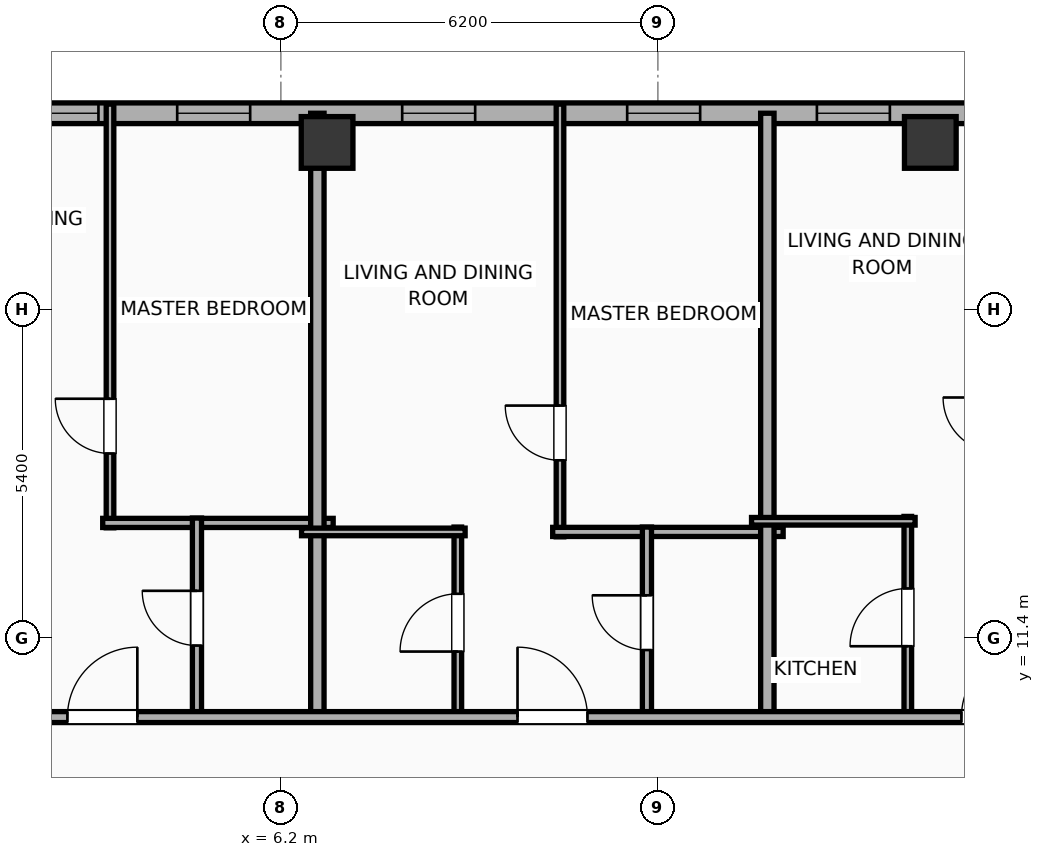
"""IFC4 building model, lengths in metres.
Left out: names, types, materials, properties, quantities, classifications, styles, units other than length and angle.
Written with IfcOpenShell. Run it as: python <this file> out.ifc"""

import sys

from ifc_helpers import new_model, si_unit, direction, frame, frame_2d, origin, origin_2d, place, context, subcontext, project, spatial, rectangle, hollow_rectangle, extrude, element, fill, save


model = new_model("IFC4")
c1 = context("Model", 3, precision=1e-05, world=origin(), true_north=direction((0.0, 1.0)))
c2 = subcontext(c1, "Body", "Model", "MODEL_VIEW")
j1 = project(units=[si_unit("LENGTHUNIT", "METRE"), si_unit("PLANEANGLEUNIT", "RADIAN")], contexts=[c1])
p1 = place(None, origin())
s1 = spatial("IfcSite", under=j1, at=p1, CompositionType="ELEMENT")
p2 = place(p1, origin())
s2 = spatial("IfcBuilding", under=s1, at=p2, CompositionType="ELEMENT")
p3 = place(p2, frame((0.0, 0.0, 235.3)))
s3 = spatial("IfcBuildingStorey", under=s2, at=p3, CompositionType="ELEMENT", Elevation=235.3)
for number, where, z_axis, x_axis in (
    (1, (16.88, 19.55, 0.0), (0.0, 0.0, 1.0), (1.0, 0.0, 0.0)),
    (2, (6.96, 19.55, 0.0), (0.0, 0.0, 1.0), (1.0, 0.0, 0.0)),
):
    element("IfcColumn", number, at=place(p3, frame(where, z_axis=z_axis, x_axis=x_axis)), inside=s3, PredefinedType="COLUMN", context=c2, shape_type="SweptSolid", body=[
        extrude(hollow_rectangle(XDim=0.85, YDim=0.85, WallThickness=0.028, at=origin_2d()), origin(), (0.0, 0.0, 1.0), 3.9),
    ])
p4 = place(p3, frame((-22.783, 20.03, 0.0), z_axis=(0.0, 0.0, 1.0), x_axis=(1.0, 0.0, 0.0)))
e3 = element("IfcWall", 3, at=p4, inside=s3, PredefinedType="ELEMENTEDWALL", context=c2, shape_type="SweptSolid", body=[
    extrude(rectangle(XDim=49.566, YDim=0.34, at=frame_2d((24.783, 0.0))), origin(), (0.0, 0.0, 1.0), 3.65),
])
p5 = place(p4, frame((23.583, 0.0, 0.75)))
e4 = element("IfcOpeningElement", 4, at=p5, cuts=e3, PredefinedType="OPENING", context=c2, shape_type="SweptSolid", body=[
    extrude(rectangle(XDim=2.4, YDim=2.1, at=frame_2d((1.2, 1.05))), frame((0.0, 0.18, 0.0), z_axis=(0.0, -1.0, 0.0), x_axis=(1.0, 0.0, 0.0)), (0.0, 0.0, 1.0), 0.36),
])
p6 = place(p4, frame((40.956, 0.0, 0.75)))
e5 = element("IfcOpeningElement", 5, at=p6, cuts=e3, PredefinedType="OPENING", context=c2, shape_type="SweptSolid", body=[
    extrude(rectangle(XDim=2.4, YDim=2.1, at=frame_2d((1.2, 1.05))), frame((0.0, 0.18, 0.0), z_axis=(0.0, -1.0, 0.0), x_axis=(1.0, 0.0, 0.0)), (0.0, 0.0, 1.0), 0.36),
])
p7 = place(p4, frame((5.078, 0.0, 0.75)))
e6 = element("IfcOpeningElement", 6, at=p7, cuts=e3, PredefinedType="OPENING", context=c2, shape_type="SweptSolid", body=[
    extrude(rectangle(XDim=1.2, YDim=2.05, at=frame_2d((0.6, 1.025))), frame((0.0, 0.18, 0.0), z_axis=(0.0, -1.0, 0.0), x_axis=(1.0, 0.0, 0.0)), (0.0, 0.0, 1.0), 0.36),
])
p8 = place(p4, frame((8.058, 0.0, 0.75)))
e7 = element("IfcOpeningElement", 7, at=p8, cuts=e3, PredefinedType="OPENING", context=c2, shape_type="SweptSolid", body=[
    extrude(rectangle(XDim=1.2, YDim=2.05, at=frame_2d((0.6, 1.025))), frame((0.0, 0.18, 0.0), z_axis=(0.0, -1.0, 0.0), x_axis=(1.0, 0.0, 0.0)), (0.0, 0.0, 1.0), 0.36),
])
p9 = place(p4, frame((12.478, 0.0, 0.75)))
e8 = element("IfcOpeningElement", 8, at=p9, cuts=e3, PredefinedType="OPENING", context=c2, shape_type="SweptSolid", body=[
    extrude(rectangle(XDim=1.2, YDim=2.05, at=frame_2d((0.6, 1.025))), frame((0.0, 0.18, 0.0), z_axis=(0.0, -1.0, 0.0), x_axis=(1.0, 0.0, 0.0)), (0.0, 0.0, 1.0), 0.36),
])
p10 = place(p4, frame((16.178, 0.0, 0.75)))
e9 = element("IfcOpeningElement", 9, at=p10, cuts=e3, PredefinedType="OPENING", context=c2, shape_type="SweptSolid", body=[
    extrude(rectangle(XDim=1.2, YDim=2.05, at=frame_2d((0.6, 1.025))), frame((0.0, 0.18, 0.0), z_axis=(0.0, -1.0, 0.0), x_axis=(1.0, 0.0, 0.0)), (0.0, 0.0, 1.0), 0.36),
])
p11 = place(p4, frame((20.478, 0.0, 0.75)))
e10 = element("IfcOpeningElement", 10, at=p11, cuts=e3, PredefinedType="OPENING", context=c2, shape_type="SweptSolid", body=[
    extrude(rectangle(XDim=1.2, YDim=2.05, at=frame_2d((0.6, 1.025))), frame((0.0, 0.18, 0.0), z_axis=(0.0, -1.0, 0.0), x_axis=(1.0, 0.0, 0.0)), (0.0, 0.0, 1.0), 0.36),
])
p12 = place(p4, frame((27.278, 0.0, 0.75)))
e11 = element("IfcOpeningElement", 11, at=p12, cuts=e3, PredefinedType="OPENING", context=c2, shape_type="SweptSolid", body=[
    extrude(rectangle(XDim=1.2, YDim=2.05, at=frame_2d((0.6, 1.025))), frame((0.0, 0.18, 0.0), z_axis=(0.0, -1.0, 0.0), x_axis=(1.0, 0.0, 0.0)), (0.0, 0.0, 1.0), 0.36),
])
p13 = place(p4, frame((30.978, 0.0, 0.75)))
e12 = element("IfcOpeningElement", 12, at=p13, cuts=e3, PredefinedType="OPENING", context=c2, shape_type="SweptSolid", body=[
    extrude(rectangle(XDim=1.2, YDim=2.05, at=frame_2d((0.6, 1.025))), frame((0.0, 0.18, 0.0), z_axis=(0.0, -1.0, 0.0), x_axis=(1.0, 0.0, 0.0)), (0.0, 0.0, 1.0), 0.36),
])
p14 = place(p4, frame((34.678, 0.0, 0.75)))
e13 = element("IfcOpeningElement", 13, at=p14, cuts=e3, PredefinedType="OPENING", context=c2, shape_type="SweptSolid", body=[
    extrude(rectangle(XDim=1.2, YDim=2.05, at=frame_2d((0.6, 1.025))), frame((0.0, 0.18, 0.0), z_axis=(0.0, -1.0, 0.0), x_axis=(1.0, 0.0, 0.0)), (0.0, 0.0, 1.0), 0.36),
])
p15 = place(p4, frame((37.798, 0.0, 0.75)))
e14 = element("IfcOpeningElement", 14, at=p15, cuts=e3, PredefinedType="OPENING", context=c2, shape_type="SweptSolid", body=[
    extrude(rectangle(XDim=1.2, YDim=2.05, at=frame_2d((0.6, 1.025))), frame((0.0, 0.18, 0.0), z_axis=(0.0, -1.0, 0.0), x_axis=(1.0, 0.0, 0.0)), (0.0, 0.0, 1.0), 0.36),
])
p16 = place(p4, frame((45.83, 0.0, 0.75)))
e15 = element("IfcOpeningElement", 15, at=p16, cuts=e3, PredefinedType="OPENING", context=c2, shape_type="SweptSolid", body=[
    extrude(rectangle(XDim=1.2, YDim=2.05, at=frame_2d((0.6, 1.025))), frame((0.0, 0.18, 0.0), z_axis=(0.0, -1.0, 0.0), x_axis=(1.0, 0.0, 0.0)), (0.0, 0.0, 1.0), 0.36),
])
p17 = place(p3, frame((3.39, 13.213, 0.0), z_axis=(0.0, 0.0, 1.0), x_axis=(0.0, 1.0, 0.0)))
e16 = element("IfcWall", 16, at=p17, inside=s3, PredefinedType="PARTITIONING", context=c2, shape_type="SweptSolid", body=[
    extrude(rectangle(XDim=6.967, YDim=0.125, at=frame_2d((3.483, 0.0))), origin(), (0.0, 0.0, 1.0), 3.65),
])
p18 = place(p17, frame((1.222, 0.0, 0.0)))
e17 = element("IfcOpeningElement", 17, at=p18, cuts=e16, PredefinedType="OPENING", context=c2, shape_type="SweptSolid", body=[
    extrude(rectangle(XDim=0.9, YDim=2.05, at=frame_2d((0.45, 1.025))), frame((0.0, 0.073, 0.0), z_axis=(0.0, -1.0, 0.0), x_axis=(1.0, 0.0, 0.0)), (0.0, 0.0, 1.0), 0.145),
])
p19 = place(p3, frame((3.27, 13.293, 0.0), z_axis=(0.0, 0.0, 1.0), x_axis=(1.0, 0.0, 0.0)))
e18 = element("IfcWall", 18, at=p19, inside=s3, PredefinedType="PLUMBINGWALL", context=c2, shape_type="SweptSolid", body=[
    extrude(rectangle(XDim=3.79, YDim=0.15, at=frame_2d((1.895, 0.0))), origin(), (0.0, 0.0, 1.0), 3.65),
])
p20 = place(p3, frame((4.82, 10.08, 0.0), z_axis=(0.0, 0.0, 1.0), x_axis=(0.0, 1.0, 0.0)))
e19 = element("IfcWall", 19, at=p20, inside=s3, PredefinedType="PLUMBINGWALL", context=c2, shape_type="SweptSolid", body=[
    extrude(rectangle(XDim=3.293, YDim=0.15, at=frame_2d((1.646, 0.0))), origin(), (0.0, 0.0, 1.0), 3.09),
])
p21 = place(p20, frame((1.197, 0.0, 0.0)))
e20 = element("IfcOpeningElement", 20, at=p21, cuts=e19, PredefinedType="OPENING", context=c2, shape_type="SweptSolid", body=[
    extrude(rectangle(XDim=0.9, YDim=2.05, at=frame_2d((0.45, 1.025))), frame((0.0, 0.085, 0.0), z_axis=(0.0, -1.0, 0.0), x_axis=(1.0, 0.0, 0.0)), (0.0, 0.0, 1.0), 0.17),
])
p22 = place(p3, frame((6.8, 10.02, 0.0), z_axis=(0.0, 0.0, 1.0), x_axis=(0.0, 1.0, 0.0)))
e21 = element("IfcWall", 21, at=p22, inside=s3, PredefinedType="PARTITIONING", context=c2, shape_type="SweptSolid", body=[
    extrude(rectangle(XDim=10.01, YDim=0.22, at=frame_2d((5.005, 0.0))), origin(), (0.0, 0.0, 1.0), 3.09),
])
p23 = place(p3, frame((10.79, 13.065, 0.0), z_axis=(0.0, 0.0, 1.0), x_axis=(0.0, 1.0, 0.0)))
e22 = element("IfcWall", 22, at=p23, inside=s3, PredefinedType="PARTITIONING", context=c2, shape_type="SweptSolid", body=[
    extrude(rectangle(XDim=7.115, YDim=0.125, at=frame_2d((3.558, 0.0))), origin(), (0.0, 0.0, 1.0), 3.65),
])
p24 = place(p23, frame((1.258, 0.0, 0.0)))
e23 = element("IfcOpeningElement", 23, at=p24, cuts=e22, PredefinedType="OPENING", context=c2, shape_type="SweptSolid", body=[
    extrude(rectangle(XDim=0.9, YDim=2.05, at=frame_2d((0.45, 1.025))), frame((0.0, 0.073, 0.0), z_axis=(0.0, -1.0, 0.0), x_axis=(1.0, 0.0, 0.0)), (0.0, 0.0, 1.0), 0.145),
])
p25 = place(p3, frame((10.67, 13.145, 0.0), z_axis=(0.0, 0.0, 1.0), x_axis=(1.0, 0.0, 0.0)))
e24 = element("IfcWall", 24, at=p25, inside=s3, PredefinedType="PLUMBINGWALL", context=c2, shape_type="SweptSolid", body=[
    extrude(rectangle(XDim=3.79, YDim=0.15, at=frame_2d((1.895, 0.0))), origin(), (0.0, 0.0, 1.0), 3.65),
])
p26 = place(p3, frame((9.11, 10.08, 0.0), z_axis=(0.0, 0.0, 1.0), x_axis=(0.0, 1.0, 0.0)))
e25 = element("IfcWall", 25, at=p26, inside=s3, PredefinedType="PARTITIONING", context=c2, shape_type="SweptSolid", body=[
    extrude(rectangle(XDim=3.145, YDim=0.125, at=frame_2d((1.573, 0.0))), origin(), (0.0, 0.0, 1.0), 3.65),
])
p27 = place(p26, frame((1.097, 0.0, 0.0)))
e26 = element("IfcOpeningElement", 26, at=p27, cuts=e25, PredefinedType="OPENING", context=c2, shape_type="SweptSolid", body=[
    extrude(rectangle(XDim=0.95, YDim=2.05, at=frame_2d((0.475, 1.025))), frame((0.0, 0.073, 0.0), z_axis=(0.0, -1.0, 0.0), x_axis=(1.0, 0.0, 0.0)), (0.0, 0.0, 1.0), 0.145),
])
p28 = place(p3, frame((6.54, 13.145, 0.0), z_axis=(0.0, 0.0, 1.0), x_axis=(1.0, 0.0, 0.0)))
e27 = element("IfcWall", 27, at=p28, inside=s3, PredefinedType="PARTITIONING", context=c2, shape_type="SweptSolid", body=[
    extrude(rectangle(XDim=2.69, YDim=0.125, at=frame_2d((1.345, 0.0))), origin(), (0.0, 0.0, 1.0), 3.65),
])
p29 = place(p3, frame((12.22, 10.08, 0.0), z_axis=(0.0, 0.0, 1.0), x_axis=(0.0, 1.0, 0.0)))
e28 = element("IfcWall", 28, at=p29, inside=s3, PredefinedType="PLUMBINGWALL", context=c2, shape_type="SweptSolid", body=[
    extrude(rectangle(XDim=3.145, YDim=0.15, at=frame_2d((1.573, 0.0))), origin(), (0.0, 0.0, 1.0), 3.65),
])
p30 = place(p29, frame((1.123, 0.0, 0.0)))
e29 = element("IfcOpeningElement", 29, at=p30, cuts=e28, PredefinedType="OPENING", context=c2, shape_type="SweptSolid", body=[
    extrude(rectangle(XDim=0.9, YDim=2.05, at=frame_2d((0.45, 1.025))), frame((0.0, 0.085, 0.0), z_axis=(0.0, -1.0, 0.0), x_axis=(1.0, 0.0, 0.0)), (0.0, 0.0, 1.0), 0.17),
])
p31 = place(p3, frame((14.2, 10.02, 0.0), z_axis=(0.0, 0.0, 1.0), x_axis=(0.0, 1.0, 0.0)))
e30 = element("IfcWall", 30, at=p31, inside=s3, PredefinedType="PARTITIONING", context=c2, shape_type="SweptSolid", body=[
    extrude(rectangle(XDim=10.01, YDim=0.22, at=frame_2d((5.005, 0.0))), origin(), (0.0, 0.0, 1.0), 3.65),
])
p32 = place(p3, frame((16.51, 10.08, 0.0), z_axis=(0.0, 0.0, 1.0), x_axis=(0.0, 1.0, 0.0)))
e31 = element("IfcWall", 31, at=p32, inside=s3, PredefinedType="PARTITIONING", context=c2, shape_type="SweptSolid", body=[
    extrude(rectangle(XDim=3.32, YDim=0.125, at=frame_2d((1.66, 0.0))), origin(), (0.0, 0.0, 1.0), 3.65),
])
p33 = place(p32, frame((1.185, 0.0, 0.0)))
e32 = element("IfcOpeningElement", 32, at=p33, cuts=e31, PredefinedType="OPENING", context=c2, shape_type="SweptSolid", body=[
    extrude(rectangle(XDim=0.95, YDim=2.05, at=frame_2d((0.475, 1.025))), frame((0.0, 0.073, 0.0), z_axis=(0.0, -1.0, 0.0), x_axis=(1.0, 0.0, 0.0)), (0.0, 0.0, 1.0), 0.145),
])
p34 = place(p3, frame((13.94, 13.32, 0.0), z_axis=(0.0, 0.0, 1.0), x_axis=(1.0, 0.0, 0.0)))
e33 = element("IfcWall", 33, at=p34, inside=s3, PredefinedType="PARTITIONING", context=c2, shape_type="SweptSolid", body=[
    extrude(rectangle(XDim=2.69, YDim=0.125, at=frame_2d((1.345, 0.0))), origin(), (0.0, 0.0, 1.0), 3.65),
])
p35 = place(p3, frame((-26.23, 10.1, 0.0), z_axis=(0.0, 0.0, 1.0), x_axis=(1.0, 0.0, 0.0)))
e34 = element("IfcWall", 34, at=p35, inside=s3, PredefinedType="PARTITIONING", context=c2, shape_type="SweptSolid", body=[
    extrude(rectangle(XDim=56.46, YDim=0.18, at=frame_2d((28.23, 0.0))), origin(), (0.0, 0.0, 1.0), 3.65),
])
p36 = place(p35, frame((5.302, 0.0, 0.0)))
e35 = element("IfcOpeningElement", 35, at=p36, cuts=e34, PredefinedType="OPENING", context=c2, shape_type="SweptSolid", body=[
    extrude(rectangle(XDim=1.15, YDim=2.05, at=frame_2d((0.575, 1.025))), frame((0.0, 0.1, 0.0), z_axis=(0.0, -1.0, 0.0), x_axis=(1.0, 0.0, 0.0)), (0.0, 0.0, 1.0), 0.2),
])
p37 = place(p35, frame((14.122, 0.0, 0.0)))
e36 = element("IfcOpeningElement", 36, at=p37, cuts=e34, PredefinedType="OPENING", context=c2, shape_type="SweptSolid", body=[
    extrude(rectangle(XDim=1.15, YDim=2.05, at=frame_2d((0.575, 1.025))), frame((0.0, 0.1, 0.0), z_axis=(0.0, -1.0, 0.0), x_axis=(1.0, 0.0, 0.0)), (0.0, 0.0, 1.0), 0.2),
])
p38 = place(p35, frame((21.518, 0.0, 0.0)))
e37 = element("IfcOpeningElement", 37, at=p38, cuts=e34, PredefinedType="OPENING", context=c2, shape_type="SweptSolid", body=[
    extrude(rectangle(XDim=1.15, YDim=2.05, at=frame_2d((0.575, 1.025))), frame((0.0, 0.1, 0.0), z_axis=(0.0, -1.0, 0.0), x_axis=(1.0, 0.0, 0.0)), (0.0, 0.0, 1.0), 0.2),
])
p39 = place(p35, frame((28.92, 0.0, 0.0)))
e38 = element("IfcOpeningElement", 38, at=p39, cuts=e34, PredefinedType="OPENING", context=c2, shape_type="SweptSolid", body=[
    extrude(rectangle(XDim=1.15, YDim=2.05, at=frame_2d((0.575, 1.025))), frame((0.0, 0.1, 0.0), z_axis=(0.0, -1.0, 0.0), x_axis=(1.0, 0.0, 0.0)), (0.0, 0.0, 1.0), 0.2),
])
p40 = place(p35, frame((36.322, 0.0, 0.0)))
e39 = element("IfcOpeningElement", 39, at=p40, cuts=e34, PredefinedType="OPENING", context=c2, shape_type="SweptSolid", body=[
    extrude(rectangle(XDim=1.15, YDim=2.05, at=frame_2d((0.575, 1.025))), frame((0.0, 0.1, 0.0), z_axis=(0.0, -1.0, 0.0), x_axis=(1.0, 0.0, 0.0)), (0.0, 0.0, 1.0), 0.2),
])
p41 = place(p35, frame((43.622, 0.0, 0.0)))
e40 = element("IfcOpeningElement", 40, at=p41, cuts=e34, PredefinedType="OPENING", context=c2, shape_type="SweptSolid", body=[
    extrude(rectangle(XDim=1.15, YDim=2.05, at=frame_2d((0.575, 1.025))), frame((0.0, 0.1, 0.0), z_axis=(0.0, -1.0, 0.0), x_axis=(1.0, 0.0, 0.0)), (0.0, 0.0, 1.0), 0.2),
])
p42 = place(p35, frame((51.781, 0.0, 0.0)))
e41 = element("IfcOpeningElement", 41, at=p42, cuts=e34, PredefinedType="OPENING", context=c2, shape_type="SweptSolid", body=[
    extrude(rectangle(XDim=1.15, YDim=2.05, at=frame_2d((0.575, 1.025))), frame((0.0, 0.1, 0.0), z_axis=(0.0, -1.0, 0.0), x_axis=(1.0, 0.0, 0.0)), (0.0, 0.0, 1.0), 0.2),
])
p43 = place(p5, origin())
e42 = element("IfcWindow", 42, at=p43, inside=s3, PartitioningType="SINGLE_PANEL", PredefinedType="WINDOW", context=c2, shape_type="SweptSolid", body=[
    extrude(rectangle(XDim=2.4, YDim=2.1, at=frame_2d((1.2, 1.05))), frame((0.0, 0.03, 0.0), z_axis=(0.0, -1.0, 0.0), x_axis=(1.0, 0.0, 0.0)), (0.0, 0.0, 1.0), 0.06),
])
fill(e4, e42)
p44 = place(p12, origin())
e43 = element("IfcWindow", 43, at=p44, inside=s3, PartitioningType="SINGLE_PANEL", PredefinedType="WINDOW", context=c2, shape_type="SweptSolid", body=[
    extrude(rectangle(XDim=1.2, YDim=2.05, at=frame_2d((0.6, 1.025))), frame((0.0, 0.03, 0.0), z_axis=(0.0, -1.0, 0.0), x_axis=(1.0, 0.0, 0.0)), (0.0, 0.0, 1.0), 0.06),
])
fill(e11, e43)
p45 = place(p13, origin())
e44 = element("IfcWindow", 44, at=p45, inside=s3, PartitioningType="SINGLE_PANEL", PredefinedType="WINDOW", context=c2, shape_type="SweptSolid", body=[
    extrude(rectangle(XDim=1.2, YDim=2.05, at=frame_2d((0.6, 1.025))), frame((0.0, 0.03, 0.0), z_axis=(0.0, -1.0, 0.0), x_axis=(1.0, 0.0, 0.0)), (0.0, 0.0, 1.0), 0.06),
])
fill(e12, e44)
p46 = place(p14, origin())
e45 = element("IfcWindow", 45, at=p46, inside=s3, PartitioningType="SINGLE_PANEL", PredefinedType="WINDOW", context=c2, shape_type="SweptSolid", body=[
    extrude(rectangle(XDim=1.2, YDim=2.05, at=frame_2d((0.6, 1.025))), frame((0.0, 0.03, 0.0), z_axis=(0.0, -1.0, 0.0), x_axis=(1.0, 0.0, 0.0)), (0.0, 0.0, 1.0), 0.06),
])
fill(e13, e45)
p47 = place(p15, origin())
e46 = element("IfcWindow", 46, at=p47, inside=s3, PartitioningType="SINGLE_PANEL", PredefinedType="WINDOW", context=c2, shape_type="SweptSolid", body=[
    extrude(rectangle(XDim=1.2, YDim=2.05, at=frame_2d((0.6, 1.025))), frame((0.0, 0.03, 0.0), z_axis=(0.0, -1.0, 0.0), x_axis=(1.0, 0.0, 0.0)), (0.0, 0.0, 1.0), 0.06),
])
fill(e14, e46)
p48 = place(p18, origin())
e47 = element("IfcDoor", 47, at=p48, inside=s3, OperationType="SINGLE_SWING_RIGHT", PredefinedType="DOOR", context=c2, shape_type="SweptSolid", body=[
    extrude(rectangle(XDim=0.9, YDim=2.05, at=frame_2d((0.45, 1.025))), frame((0.0, 0.025, 0.0), z_axis=(0.0, -1.0, 0.0), x_axis=(1.0, 0.0, 0.0)), (0.0, 0.0, 1.0), 0.05),
])
fill(e17, e47)
p49 = place(p21, origin())
e48 = element("IfcDoor", 48, at=p49, inside=s3, OperationType="SINGLE_SWING_RIGHT", PredefinedType="DOOR", context=c2, shape_type="SweptSolid", body=[
    extrude(rectangle(XDim=0.9, YDim=2.05, at=frame_2d((0.45, 1.025))), frame((0.0, 0.025, 0.0), z_axis=(0.0, -1.0, 0.0), x_axis=(1.0, 0.0, 0.0)), (0.0, 0.0, 1.0), 0.05),
])
fill(e20, e48)
p50 = place(p24, origin())
e49 = element("IfcDoor", 49, at=p50, inside=s3, OperationType="SINGLE_SWING_RIGHT", PredefinedType="DOOR", context=c2, shape_type="SweptSolid", body=[
    extrude(rectangle(XDim=0.9, YDim=2.05, at=frame_2d((0.45, 1.025))), frame((0.0, 0.025, 0.0), z_axis=(0.0, -1.0, 0.0), x_axis=(1.0, 0.0, 0.0)), (0.0, 0.0, 1.0), 0.05),
])
fill(e23, e49)
p51 = place(p27, origin())
e50 = element("IfcDoor", 50, at=p51, inside=s3, OperationType="SINGLE_SWING_LEFT", PredefinedType="DOOR", context=c2, shape_type="SweptSolid", body=[
    extrude(rectangle(XDim=0.95, YDim=2.05, at=frame_2d((0.475, 1.025))), frame((0.0, 0.025, 0.0), z_axis=(0.0, -1.0, 0.0), x_axis=(1.0, 0.0, 0.0)), (0.0, 0.0, 1.0), 0.05),
])
fill(e26, e50)
p52 = place(p30, origin())
e51 = element("IfcDoor", 51, at=p52, inside=s3, OperationType="SINGLE_SWING_RIGHT", PredefinedType="DOOR", context=c2, shape_type="SweptSolid", body=[
    extrude(rectangle(XDim=0.9, YDim=2.05, at=frame_2d((0.45, 1.025))), frame((0.0, 0.025, 0.0), z_axis=(0.0, -1.0, 0.0), x_axis=(1.0, 0.0, 0.0)), (0.0, 0.0, 1.0), 0.05),
])
fill(e29, e51)
p53 = place(p33, origin())
e52 = element("IfcDoor", 52, at=p53, inside=s3, OperationType="SINGLE_SWING_LEFT", PredefinedType="DOOR", context=c2, shape_type="SweptSolid", body=[
    extrude(rectangle(XDim=0.95, YDim=2.05, at=frame_2d((0.475, 1.025))), frame((0.0, 0.025, 0.0), z_axis=(0.0, -1.0, 0.0), x_axis=(1.0, 0.0, 0.0)), (0.0, 0.0, 1.0), 0.05),
])
fill(e32, e52)
p54 = place(p39, origin())
e53 = element("IfcDoor", 53, at=p54, inside=s3, OperationType="SINGLE_SWING_RIGHT", PredefinedType="DOOR", context=c2, shape_type="SweptSolid", body=[
    extrude(rectangle(XDim=1.15, YDim=2.05, at=frame_2d((0.575, 1.025))), frame((0.0, 0.025, 0.0), z_axis=(0.0, -1.0, 0.0), x_axis=(1.0, 0.0, 0.0)), (0.0, 0.0, 1.0), 0.05),
])
fill(e38, e53)
p55 = place(p40, origin())
e54 = element("IfcDoor", 54, at=p55, inside=s3, OperationType="SINGLE_SWING_LEFT", PredefinedType="DOOR", context=c2, shape_type="SweptSolid", body=[
    extrude(rectangle(XDim=1.15, YDim=2.05, at=frame_2d((0.575, 1.025))), frame((0.0, 0.025, 0.0), z_axis=(0.0, -1.0, 0.0), x_axis=(1.0, 0.0, 0.0)), (0.0, 0.0, 1.0), 0.05),
])
fill(e39, e54)
p56 = place(p41, origin())
e55 = element("IfcDoor", 55, at=p56, inside=s3, OperationType="SINGLE_SWING_RIGHT", PredefinedType="DOOR", context=c2, shape_type="SweptSolid", body=[
    extrude(rectangle(XDim=1.15, YDim=2.05, at=frame_2d((0.575, 1.025))), frame((0.0, 0.025, 0.0), z_axis=(0.0, -1.0, 0.0), x_axis=(1.0, 0.0, 0.0)), (0.0, 0.0, 1.0), 0.05),
])
fill(e40, e55)
save(model, sys.argv[1])
